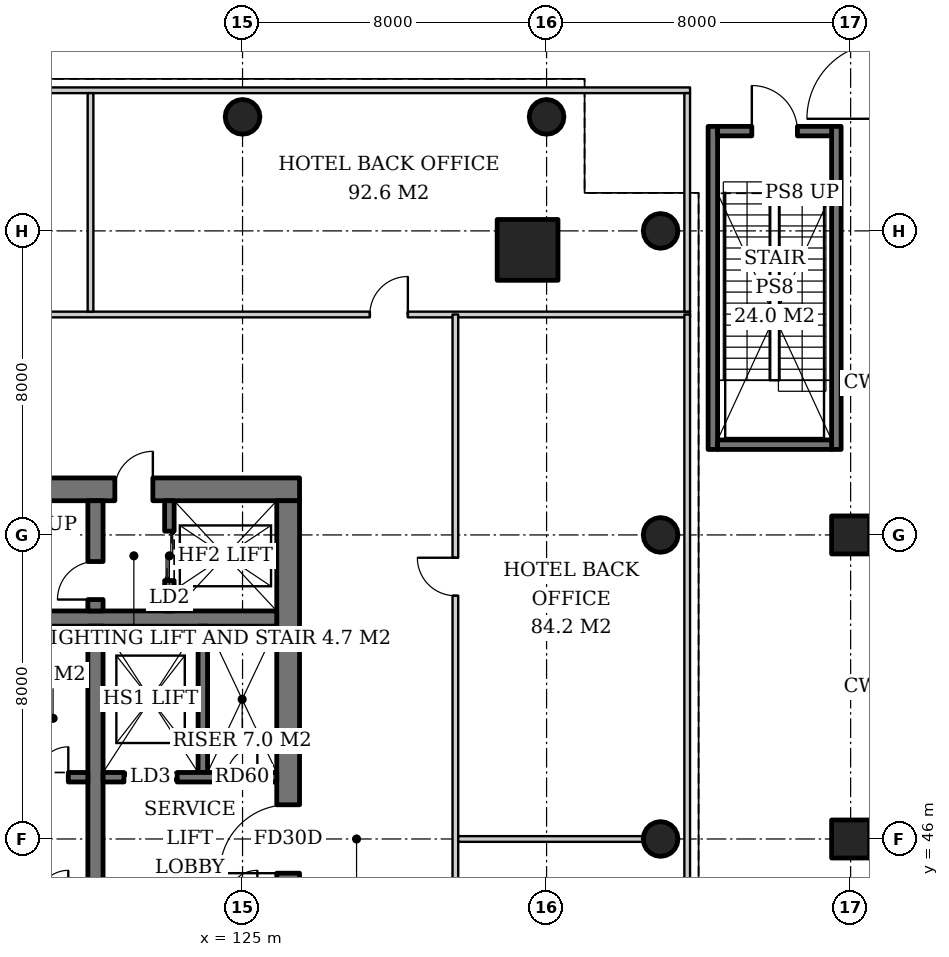
"""IFC4 building model, lengths in metres.
Left out: names, types, materials, properties, quantities, classifications, styles, units other than length and angle.
Written with IfcOpenShell. Run it as: python <this file> out.ifc"""

import sys

from ifc_helpers import new_model, si_unit, direction, frame, frame_2d, origin, origin_2d, place, context, subcontext, project, spatial, rectangle, hollow_circle, extrude, element, fill, save


model = new_model("IFC4")
c1 = context("Model", 3, precision=1e-05, world=origin(), true_north=direction((0.0, 1.0)))
c2 = subcontext(c1, "Body", "Model", "MODEL_VIEW")
j1 = project(units=[si_unit("LENGTHUNIT", "METRE"), si_unit("PLANEANGLEUNIT", "RADIAN")], contexts=[c1])
p1 = place(None, origin())
s1 = spatial("IfcSite", under=j1, at=p1, CompositionType="ELEMENT")
p2 = place(p1, origin())
s2 = spatial("IfcBuilding", under=s1, at=p2, CompositionType="ELEMENT")
p3 = place(p2, origin())
s3 = spatial("IfcBuildingStorey", under=s2, at=p3, CompositionType="ELEMENT", Elevation=0.0)
for number, where, z_axis, x_axis in (
    (1, (141.0, 46.0, 0.0), (0.0, 0.0, 1.0), (1.0, 0.0, 0.0)),
    (2, (141.0, 54.0, 0.0), (0.0, 0.0, 1.0), (1.0, 0.0, 0.0)),
):
    element("IfcColumn", number, at=place(p3, frame(where, z_axis=z_axis, x_axis=x_axis)), inside=s3, PredefinedType="COLUMN", context=c2, shape_type="SweptSolid", body=[
        extrude(rectangle(XDim=1.0, YDim=1.0, at=origin_2d()), origin(), (0.0, 0.0, 1.0), 6.0),
    ])
p4 = place(p3, frame((132.5, 61.5, 0.0), z_axis=(0.0, 0.0, 1.0), x_axis=(1.0, 0.0, 0.0)))
e3 = element("IfcColumn", 3, at=p4, inside=s3, PredefinedType="COLUMN", context=c2, shape_type="SweptSolid", body=[
    extrude(rectangle(XDim=1.6, YDim=1.6, at=origin_2d()), origin(), (0.0, 0.0, 1.0), 6.0),
])
for number, where, z_axis, x_axis in (
    (4, (136.0, 62.0, 0.0), (0.0, 0.0, 1.0), (1.0, 0.0, 0.0)),
    (5, (136.0, 46.0, 0.0), (0.0, 0.0, 1.0), (1.0, 0.0, 0.0)),
    (6, (136.0, 54.0, 0.0), (0.0, 0.0, 1.0), (1.0, 0.0, 0.0)),
    (7, (133.0, 65.0, 0.0), (0.0, 0.0, 1.0), (1.0, 0.0, 0.0)),
    (8, (125.0, 65.0, 0.0), (0.0, 0.0, 1.0), (1.0, 0.0, 0.0)),
):
    element("IfcColumn", number, at=place(p3, frame(where, z_axis=z_axis, x_axis=x_axis)), inside=s3, PredefinedType="COLUMN", context=c2, shape_type="SweptSolid", body=[
        extrude(hollow_circle(Radius=0.457, WallThickness=0.03, at=origin_2d()), origin(), (0.0, 0.0, 1.0), 6.0),
    ])
p5 = place(p3, frame((107.5, 55.2, 0.0), z_axis=(0.0, 0.0, 1.0), x_axis=(1.0, 0.0, 0.0)))
e9 = element("IfcWall", 9, at=p5, inside=s3, PredefinedType="SHEAR", context=c2, shape_type="SweptSolid", body=[
    extrude(rectangle(XDim=19.0, YDim=0.6, at=frame_2d((9.5, 0.0))), origin(), (0.0, 0.0, 1.0), 6.0),
])
p6 = place(p5, frame((14.14, 0.0, 0.0)))
e10 = element("IfcOpeningElement", 10, at=p6, cuts=e9, PredefinedType="OPENING", context=c2, shape_type="SweptSolid", body=[
    extrude(rectangle(XDim=1.0, YDim=2.1, at=frame_2d((0.5, 1.05))), frame((0.0, 0.31, 0.0), z_axis=(0.0, -1.0, 0.0), x_axis=(1.0, 0.0, 0.0)), (0.0, 0.0, 1.0), 0.62),
])
p7 = place(p5, frame((1.675, 0.0, 0.0)))
e11 = element("IfcOpeningElement", 11, at=p7, cuts=e9, PredefinedType="OPENING", context=c2, shape_type="SweptSolid", body=[
    extrude(rectangle(XDim=1.0, YDim=2.1, at=frame_2d((0.5, 1.05))), frame((0.0, 0.31, 0.0), z_axis=(0.0, -1.0, 0.0), x_axis=(1.0, 0.0, 0.0)), (0.0, 0.0, 1.0), 0.62),
])
p8 = place(p5, frame((3.587, 0.0, 0.0)))
e12 = element("IfcOpeningElement", 12, at=p8, cuts=e9, PredefinedType="OPENING", context=c2, shape_type="SweptSolid", body=[
    extrude(rectangle(XDim=1.0, YDim=2.1, at=frame_2d((0.5, 1.05))), frame((0.0, 0.31, 0.0), z_axis=(0.0, -1.0, 0.0), x_axis=(1.0, 0.0, 0.0)), (0.0, 0.0, 1.0), 0.62),
])
p9 = place(p3, frame((126.2, 37.1, 0.0), z_axis=(0.0, 0.0, 1.0), x_axis=(0.0, 1.0, 0.0)))
e13 = element("IfcWall", 13, at=p9, inside=s3, PredefinedType="SHEAR", context=c2, shape_type="SweptSolid", body=[
    extrude(rectangle(XDim=17.8, YDim=0.6, at=frame_2d((8.9, 0.0))), origin(), (0.0, 0.0, 1.0), 6.0),
])
p10 = place(p9, frame((8.0, 0.0, 0.0)))
e14 = element("IfcOpeningElement", 14, at=p10, cuts=e13, PredefinedType="OPENING", context=c2, shape_type="SweptSolid", body=[
    extrude(rectangle(XDim=1.8, YDim=2.4, at=frame_2d((0.9, 1.2))), frame((0.0, 0.31, 0.0), z_axis=(0.0, -1.0, 0.0), x_axis=(1.0, 0.0, 0.0)), (0.0, 0.0, 1.0), 0.62),
])
p11 = place(p3, frame((108.1, 51.8, 0.0), z_axis=(0.0, 0.0, 1.0), x_axis=(1.0, 0.0, 0.0)))
e15 = element("IfcWall", 15, at=p11, inside=s3, PredefinedType="SHEAR", context=c2, shape_type="SweptSolid", body=[
    extrude(rectangle(XDim=17.8, YDim=0.4, at=frame_2d((8.9, 0.0))), origin(), (0.0, 0.0, 1.0), 6.0),
])
p12 = place(p3, frame((121.13, 40.4, 0.0), z_axis=(0.0, 0.0, 1.0), x_axis=(0.0, 1.0, 0.0)))
e16 = element("IfcWall", 16, at=p12, inside=s3, PredefinedType="SHEAR", context=c2, shape_type="SweptSolid", body=[
    extrude(rectangle(XDim=11.2, YDim=0.4, at=frame_2d((5.6, 0.0))), origin(), (0.0, 0.0, 1.0), 6.0),
])
p13 = place(p3, frame((121.13, 52.0, 0.0), z_axis=(0.0, 0.0, 1.0), x_axis=(0.0, 1.0, 0.0)))
e17 = element("IfcWall", 17, at=p13, inside=s3, PredefinedType="SHEAR", context=c2, shape_type="SweptSolid", body=[
    extrude(rectangle(XDim=2.9, YDim=0.4, at=frame_2d((1.45, 0.0))), origin(), (0.0, 0.0, 1.0), 6.0),
])
p14 = place(p13, frame((0.3, 0.0, 0.0)))
e18 = element("IfcOpeningElement", 18, at=p14, cuts=e17, PredefinedType="OPENING", context=c2, shape_type="SweptSolid", body=[
    extrude(rectangle(XDim=1.0, YDim=2.1, at=frame_2d((0.5, 1.05))), frame((0.0, 0.21, 0.0), z_axis=(0.0, -1.0, 0.0), x_axis=(1.0, 0.0, 0.0)), (0.0, 0.0, 1.0), 0.42),
])
p15 = place(p3, frame((123.075, 52.0, 0.0), z_axis=(0.0, 0.0, 1.0), x_axis=(0.0, 1.0, 0.0)))
e19 = element("IfcWall", 19, at=p15, inside=s3, PredefinedType="SHEAR", context=c2, shape_type="SweptSolid", body=[
    extrude(rectangle(XDim=2.9, YDim=0.25, at=frame_2d((1.45, 0.0))), origin(), (0.0, 0.0, 1.0), 6.0),
])
p16 = place(p15, frame((0.8, 0.0, 0.0)))
e20 = element("IfcOpeningElement", 20, at=p16, cuts=e19, PredefinedType="OPENING", context=c2, shape_type="SweptSolid", body=[
    extrude(rectangle(XDim=1.3, YDim=2.2, at=frame_2d((0.65, 1.1))), frame((0.0, 0.135, 0.0), z_axis=(0.0, -1.0, 0.0), x_axis=(1.0, 0.0, 0.0)), (0.0, 0.0, 1.0), 0.27),
])
p17 = place(p3, frame((108.1, 47.625, 0.0), z_axis=(0.0, 0.0, 1.0), x_axis=(1.0, 0.0, 0.0)))
e21 = element("IfcWall", 21, at=p17, inside=s3, PredefinedType="SHEAR", context=c2, shape_type="SweptSolid", body=[
    extrude(rectangle(XDim=12.83, YDim=0.25, at=frame_2d((6.415, 0.0))), origin(), (0.0, 0.0, 1.0), 6.0),
])
p18 = place(p17, frame((0.7, 0.0, 0.0)))
e22 = element("IfcOpeningElement", 22, at=p18, cuts=e21, PredefinedType="OPENING", context=c2, shape_type="SweptSolid", body=[
    extrude(rectangle(XDim=1.1, YDim=2.2, at=frame_2d((0.55, 1.1))), frame((0.0, 0.135, 0.0), z_axis=(0.0, -1.0, 0.0), x_axis=(1.0, 0.0, 0.0)), (0.0, 0.0, 1.0), 0.27),
])
p19 = place(p17, frame((3.45, 0.0, 0.0)))
e23 = element("IfcOpeningElement", 23, at=p19, cuts=e21, PredefinedType="OPENING", context=c2, shape_type="SweptSolid", body=[
    extrude(rectangle(XDim=1.1, YDim=2.2, at=frame_2d((0.55, 1.1))), frame((0.0, 0.135, 0.0), z_axis=(0.0, -1.0, 0.0), x_axis=(1.0, 0.0, 0.0)), (0.0, 0.0, 1.0), 0.27),
])
p20 = place(p17, frame((6.2, 0.0, 0.0)))
e24 = element("IfcOpeningElement", 24, at=p20, cuts=e21, PredefinedType="OPENING", context=c2, shape_type="SweptSolid", body=[
    extrude(rectangle(XDim=1.1, YDim=2.2, at=frame_2d((0.55, 1.1))), frame((0.0, 0.135, 0.0), z_axis=(0.0, -1.0, 0.0), x_axis=(1.0, 0.0, 0.0)), (0.0, 0.0, 1.0), 0.27),
])
p21 = place(p17, frame((8.95, 0.0, 0.0)))
e25 = element("IfcOpeningElement", 25, at=p21, cuts=e21, PredefinedType="OPENING", context=c2, shape_type="SweptSolid", body=[
    extrude(rectangle(XDim=1.1, YDim=2.2, at=frame_2d((0.55, 1.1))), frame((0.0, 0.135, 0.0), z_axis=(0.0, -1.0, 0.0), x_axis=(1.0, 0.0, 0.0)), (0.0, 0.0, 1.0), 0.27),
])
p22 = place(p17, frame((11.515, 0.0, 0.0)))
e26 = element("IfcOpeningElement", 26, at=p22, cuts=e21, PredefinedType="OPENING", context=c2, shape_type="SweptSolid", body=[
    extrude(rectangle(XDim=0.8, YDim=2.0, at=frame_2d((0.4, 1.0))), frame((0.0, 0.135, 0.0), z_axis=(0.0, -1.0, 0.0), x_axis=(1.0, 0.0, 0.0)), (0.0, 0.0, 1.0), 0.27),
])
p23 = place(p3, frame((123.955, 47.75, 0.0), z_axis=(0.0, 0.0, 1.0), x_axis=(0.0, 1.0, 0.0)))
e27 = element("IfcWall", 27, at=p23, inside=s3, PredefinedType="SHEAR", context=c2, shape_type="SweptSolid", body=[
    extrude(rectangle(XDim=3.85, YDim=0.25, at=frame_2d((1.925, 0.0))), origin(), (0.0, 0.0, 1.0), 6.0),
])
p24 = place(p3, frame((121.33, 47.625, 0.0), z_axis=(0.0, 0.0, 1.0), x_axis=(1.0, 0.0, 0.0)))
e28 = element("IfcWall", 28, at=p24, inside=s3, PredefinedType="SHEAR", context=c2, shape_type="SweptSolid", body=[
    extrude(rectangle(XDim=4.57, YDim=0.25, at=frame_2d((2.285, 0.0))), origin(), (0.0, 0.0, 1.0), 6.0),
])
p25 = place(p24, frame((0.55, 0.0, 0.0)))
e29 = element("IfcOpeningElement", 29, at=p25, cuts=e28, PredefinedType="OPENING", context=c2, shape_type="SweptSolid", body=[
    extrude(rectangle(XDim=1.4, YDim=2.4, at=frame_2d((0.7, 1.2))), frame((0.0, 0.135, 0.0), z_axis=(0.0, -1.0, 0.0), x_axis=(1.0, 0.0, 0.0)), (0.0, 0.0, 1.0), 0.27),
])
p26 = place(p24, frame((3.26, 0.0, 0.0)))
e30 = element("IfcOpeningElement", 30, at=p26, cuts=e28, PredefinedType="OPENING", context=c2, shape_type="SweptSolid", body=[
    extrude(rectangle(XDim=0.8, YDim=2.0, at=frame_2d((0.4, 1.0))), frame((0.0, 0.135, 0.0), z_axis=(0.0, -1.0, 0.0), x_axis=(1.0, 0.0, 0.0)), (0.0, 0.0, 1.0), 0.27),
])
for number, where, z_axis, x_axis in (
    (31, (137.375, 56.25, 0.0), (0.0, 0.0, 1.0), (0.0, 1.0, 0.0)),
    (32, (140.625, 56.25, 0.0), (0.0, 0.0, 1.0), (0.0, 1.0, 0.0)),
):
    element("IfcWall", number, at=place(p3, frame(where, z_axis=z_axis, x_axis=x_axis)), inside=s3, PredefinedType="SOLIDWALL", context=c2, shape_type="SweptSolid", body=[
        extrude(rectangle(XDim=8.5, YDim=0.25, at=frame_2d((4.25, 0.0))), origin(), (0.0, 0.0, 1.0), 5.7),
    ])
p27 = place(p3, frame((137.5, 56.375, 0.0), z_axis=(0.0, 0.0, 1.0), x_axis=(1.0, 0.0, 0.0)))
e33 = element("IfcWall", 33, at=p27, inside=s3, PredefinedType="SOLIDWALL", context=c2, shape_type="SweptSolid", body=[
    extrude(rectangle(XDim=3.0, YDim=0.25, at=frame_2d((1.5, 0.0))), origin(), (0.0, 0.0, 1.0), 5.7),
])
p28 = place(p3, frame((137.5, 64.625, 0.0), z_axis=(0.0, 0.0, 1.0), x_axis=(1.0, 0.0, 0.0)))
e34 = element("IfcWall", 34, at=p28, inside=s3, PredefinedType="SOLIDWALL", context=c2, shape_type="SweptSolid", body=[
    extrude(rectangle(XDim=3.0, YDim=0.25, at=frame_2d((1.5, 0.0))), origin(), (0.0, 0.0, 1.0), 5.7),
])
p29 = place(p28, frame((0.9, 0.0, 0.0)))
e35 = element("IfcOpeningElement", 35, at=p29, cuts=e34, PredefinedType="OPENING", context=c2, shape_type="SweptSolid", body=[
    extrude(rectangle(XDim=1.2, YDim=2.1, at=frame_2d((0.6, 1.05))), frame((0.0, 0.135, 0.0), z_axis=(0.0, -1.0, 0.0), x_axis=(1.0, 0.0, 0.0)), (0.0, 0.0, 1.0), 0.27),
])
p30 = place(p3, frame((97.225, 59.8, 0.0), z_axis=(0.0, 0.0, 1.0), x_axis=(1.0, 0.0, 0.0)))
e36 = element("IfcWall", 36, at=p30, inside=s3, PredefinedType="PARTITIONING", context=c2, shape_type="SweptSolid", body=[
    extrude(rectangle(XDim=39.55, YDim=0.15, at=frame_2d((19.775, 0.0))), origin(), (0.0, 0.0, 1.0), 4.9),
])
p31 = place(p30, frame((7.425, 0.0, 0.0)))
e37 = element("IfcOpeningElement", 37, at=p31, cuts=e36, PredefinedType="OPENING", context=c2, shape_type="SweptSolid", body=[
    extrude(rectangle(XDim=1.0, YDim=2.1, at=frame_2d((0.5, 1.05))), frame((0.0, 0.085, 0.0), z_axis=(0.0, -1.0, 0.0), x_axis=(1.0, 0.0, 0.0)), (0.0, 0.0, 1.0), 0.17),
])
p32 = place(p30, frame((19.275, 0.0, 0.0)))
e38 = element("IfcOpeningElement", 38, at=p32, cuts=e36, PredefinedType="OPENING", context=c2, shape_type="SweptSolid", body=[
    extrude(rectangle(XDim=1.0, YDim=2.1, at=frame_2d((0.5, 1.05))), frame((0.0, 0.085, 0.0), z_axis=(0.0, -1.0, 0.0), x_axis=(1.0, 0.0, 0.0)), (0.0, 0.0, 1.0), 0.17),
])
p33 = place(p30, frame((31.125, 0.0, 0.0)))
e39 = element("IfcOpeningElement", 39, at=p33, cuts=e36, PredefinedType="OPENING", context=c2, shape_type="SweptSolid", body=[
    extrude(rectangle(XDim=1.0, YDim=2.1, at=frame_2d((0.5, 1.05))), frame((0.0, 0.085, 0.0), z_axis=(0.0, -1.0, 0.0), x_axis=(1.0, 0.0, 0.0)), (0.0, 0.0, 1.0), 0.17),
])
p34 = place(p3, frame((97.225, 65.7, 0.0), z_axis=(0.0, 0.0, 1.0), x_axis=(1.0, 0.0, 0.0)))
e40 = element("IfcWall", 40, at=p34, inside=s3, PredefinedType="PARTITIONING", context=c2, shape_type="SweptSolid", body=[
    extrude(rectangle(XDim=39.55, YDim=0.15, at=frame_2d((19.775, 0.0))), origin(), (0.0, 0.0, 1.0), 5.7),
])
p35 = place(p3, frame((136.7, 59.875, 0.0), z_axis=(0.0, 0.0, 1.0), x_axis=(0.0, 1.0, 0.0)))
e41 = element("IfcWall", 41, at=p35, inside=s3, PredefinedType="PARTITIONING", context=c2, shape_type="SweptSolid", body=[
    extrude(rectangle(XDim=5.75, YDim=0.15, at=frame_2d((2.875, 0.0))), origin(), (0.0, 0.0, 1.0), 5.7),
])
p36 = place(p3, frame((121.0, 59.875, 0.0), z_axis=(0.0, 0.0, 1.0), x_axis=(0.0, 1.0, 0.0)))
e42 = element("IfcWall", 42, at=p36, inside=s3, PredefinedType="PARTITIONING", context=c2, shape_type="SweptSolid", body=[
    extrude(rectangle(XDim=5.75, YDim=0.15, at=frame_2d((2.875, 0.0))), origin(), (0.0, 0.0, 1.0), 5.15),
])
p37 = place(p3, frame((130.6, 32.2, 0.0), z_axis=(0.0, 0.0, 1.0), x_axis=(0.0, 1.0, 0.0)))
e43 = element("IfcWall", 43, at=p37, inside=s3, PredefinedType="PARTITIONING", context=c2, shape_type="SweptSolid", body=[
    extrude(rectangle(XDim=27.6, YDim=0.15, at=frame_2d((13.8, 0.0))), origin(), (0.0, 0.0, 1.0), 4.9),
])
p38 = place(p37, frame((6.4, 0.0, 0.0)))
e44 = element("IfcOpeningElement", 44, at=p38, cuts=e43, PredefinedType="OPENING", context=c2, shape_type="SweptSolid", body=[
    extrude(rectangle(XDim=1.0, YDim=2.1, at=frame_2d((0.5, 1.05))), frame((0.0, 0.085, 0.0), z_axis=(0.0, -1.0, 0.0), x_axis=(1.0, 0.0, 0.0)), (0.0, 0.0, 1.0), 0.17),
])
p39 = place(p37, frame((20.2, 0.0, 0.0)))
e45 = element("IfcOpeningElement", 45, at=p39, cuts=e43, PredefinedType="OPENING", context=c2, shape_type="SweptSolid", body=[
    extrude(rectangle(XDim=1.0, YDim=2.1, at=frame_2d((0.5, 1.05))), frame((0.0, 0.085, 0.0), z_axis=(0.0, -1.0, 0.0), x_axis=(1.0, 0.0, 0.0)), (0.0, 0.0, 1.0), 0.17),
])
p40 = place(p3, frame((136.7, 32.2, 0.0), z_axis=(0.0, 0.0, 1.0), x_axis=(0.0, 1.0, 0.0)))
e46 = element("IfcWall", 46, at=p40, inside=s3, PredefinedType="PARTITIONING", context=c2, shape_type="SweptSolid", body=[
    extrude(rectangle(XDim=27.6, YDim=0.15, at=frame_2d((13.8, 0.0))), origin(), (0.0, 0.0, 1.0), 5.7),
])
p41 = place(p3, frame((130.675, 46.0, 0.0), z_axis=(0.0, 0.0, 1.0), x_axis=(1.0, 0.0, 0.0)))
e47 = element("IfcWall", 47, at=p41, inside=s3, PredefinedType="PARTITIONING", context=c2, shape_type="SweptSolid", body=[
    extrude(rectangle(XDim=4.868, YDim=0.15, at=frame_2d((2.434, 0.0))), origin(), (0.0, 0.0, 1.0), 5.7),
])
p42 = place(p16, origin())
e48 = element("IfcDoor", 48, at=p42, inside=s3, OperationType="DOUBLE_DOOR_SLIDING", PredefinedType="DOOR", context=c2, shape_type="SweptSolid", body=[
    extrude(rectangle(XDim=1.3, YDim=2.2, at=frame_2d((0.65, 1.1))), frame((0.0, 0.025, 0.0), z_axis=(0.0, -1.0, 0.0), x_axis=(1.0, 0.0, 0.0)), (0.0, 0.0, 1.0), 0.05),
])
fill(e20, e48)
p43 = place(p22, origin())
e49 = element("IfcDoor", 49, at=p43, inside=s3, OperationType="SINGLE_SWING_RIGHT", PredefinedType="DOOR", context=c2, shape_type="SweptSolid", body=[
    extrude(rectangle(XDim=0.8, YDim=2.0, at=frame_2d((0.4, 1.0))), frame((0.0, 0.025, 0.0), z_axis=(0.0, -1.0, 0.0), x_axis=(1.0, 0.0, 0.0)), (0.0, 0.0, 1.0), 0.05),
])
fill(e26, e49)
p44 = place(p25, origin())
e50 = element("IfcDoor", 50, at=p44, inside=s3, OperationType="DOUBLE_DOOR_SLIDING", PredefinedType="DOOR", context=c2, shape_type="SweptSolid", body=[
    extrude(rectangle(XDim=1.4, YDim=2.4, at=frame_2d((0.7, 1.2))), frame((0.0, 0.025, 0.0), z_axis=(0.0, -1.0, 0.0), x_axis=(1.0, 0.0, 0.0)), (0.0, 0.0, 1.0), 0.05),
])
fill(e29, e50)
p45 = place(p26, origin())
e51 = element("IfcDoor", 51, at=p45, inside=s3, OperationType="SINGLE_SWING_RIGHT", PredefinedType="DOOR", context=c2, shape_type="SweptSolid", body=[
    extrude(rectangle(XDim=0.8, YDim=2.0, at=frame_2d((0.4, 1.0))), frame((0.0, 0.025, 0.0), z_axis=(0.0, -1.0, 0.0), x_axis=(1.0, 0.0, 0.0)), (0.0, 0.0, 1.0), 0.05),
])
fill(e30, e51)
p46 = place(p14, origin())
e52 = element("IfcDoor", 52, at=p46, inside=s3, OperationType="SINGLE_SWING_LEFT", PredefinedType="DOOR", context=c2, shape_type="SweptSolid", body=[
    extrude(rectangle(XDim=1.0, YDim=2.1, at=frame_2d((0.5, 1.05))), frame((0.0, 0.025, 0.0), z_axis=(0.0, -1.0, 0.0), x_axis=(1.0, 0.0, 0.0)), (0.0, 0.0, 1.0), 0.05),
])
fill(e18, e52)
p47 = place(p6, origin())
e53 = element("IfcDoor", 53, at=p47, inside=s3, OperationType="SINGLE_SWING_RIGHT", PredefinedType="DOOR", context=c2, shape_type="SweptSolid", body=[
    extrude(rectangle(XDim=1.0, YDim=2.1, at=frame_2d((0.5, 1.05))), frame((0.0, 0.025, 0.0), z_axis=(0.0, -1.0, 0.0), x_axis=(1.0, 0.0, 0.0)), (0.0, 0.0, 1.0), 0.05),
])
fill(e10, e53)
p48 = place(p10, origin())
e54 = element("IfcDoor", 54, at=p48, inside=s3, OperationType="DOUBLE_DOOR_SINGLE_SWING", PredefinedType="DOOR", context=c2, shape_type="SweptSolid", body=[
    extrude(rectangle(XDim=1.8, YDim=2.4, at=frame_2d((0.9, 1.2))), frame((0.0, 0.025, 0.0), z_axis=(0.0, -1.0, 0.0), x_axis=(1.0, 0.0, 0.0)), (0.0, 0.0, 1.0), 0.05),
])
fill(e14, e54)
p49 = place(p29, origin())
e55 = element("IfcDoor", 55, at=p49, inside=s3, OperationType="SINGLE_SWING_LEFT", PredefinedType="DOOR", context=c2, shape_type="SweptSolid", body=[
    extrude(rectangle(XDim=1.2, YDim=2.1, at=frame_2d((0.6, 1.05))), frame((0.0, 0.025, 0.0), z_axis=(0.0, -1.0, 0.0), x_axis=(1.0, 0.0, 0.0)), (0.0, 0.0, 1.0), 0.05),
])
fill(e35, e55)
p50 = place(p33, origin())
e56 = element("IfcDoor", 56, at=p50, inside=s3, OperationType="SINGLE_SWING_RIGHT", PredefinedType="DOOR", context=c2, shape_type="SweptSolid", body=[
    extrude(rectangle(XDim=1.0, YDim=2.1, at=frame_2d((0.5, 1.05))), frame((0.0, 0.025, 0.0), z_axis=(0.0, -1.0, 0.0), x_axis=(1.0, 0.0, 0.0)), (0.0, 0.0, 1.0), 0.05),
])
fill(e39, e56)
p51 = place(p39, origin())
e57 = element("IfcDoor", 57, at=p51, inside=s3, OperationType="SINGLE_SWING_RIGHT", PredefinedType="DOOR", context=c2, shape_type="SweptSolid", body=[
    extrude(rectangle(XDim=1.0, YDim=2.1, at=frame_2d((0.5, 1.05))), frame((0.0, 0.025, 0.0), z_axis=(0.0, -1.0, 0.0), x_axis=(1.0, 0.0, 0.0)), (0.0, 0.0, 1.0), 0.05),
])
fill(e45, e57)
save(model, sys.argv[1])
